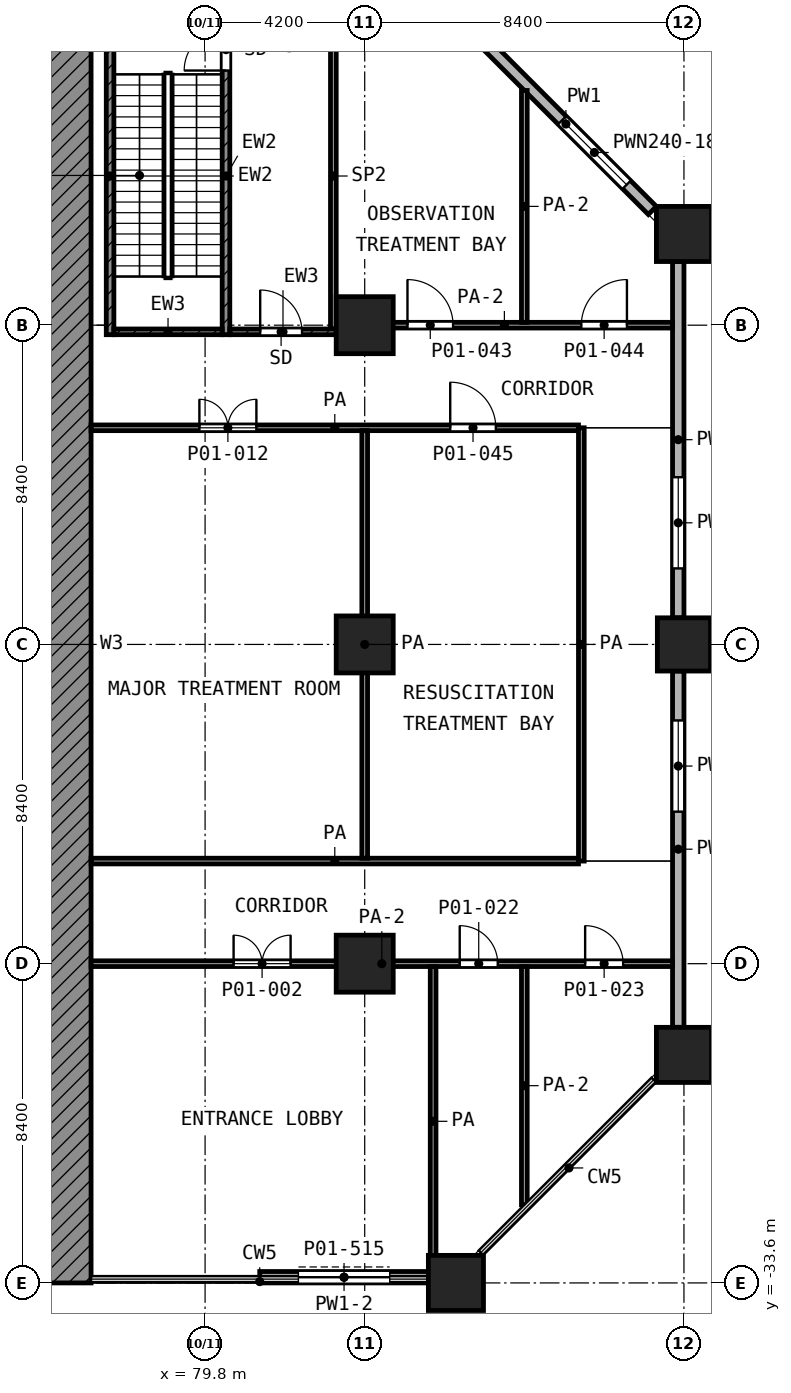
"""IFC4 building model, lengths in metres.
Left out: names, types, materials, properties, quantities, classifications, styles, units other than length and angle.
Written with IfcOpenShell. Run it as: python <this file> out.ifc"""

import sys

from ifc_helpers import new_model, si_unit, direction, frame, frame_2d, origin, origin_2d, place, context, subcontext, project, spatial, polyline, rectangle, outline, extrude, element, fill, save


model = new_model("IFC4")
c1 = context("Model", 3, precision=1e-05, world=origin(), true_north=direction((0.0, 1.0)))
c2 = subcontext(c1, "Body", "Model", "MODEL_VIEW")
j1 = project(units=[si_unit("LENGTHUNIT", "METRE"), si_unit("PLANEANGLEUNIT", "RADIAN")], contexts=[c1])
p1 = place(None, origin())
s1 = spatial("IfcSite", under=j1, at=p1, CompositionType="ELEMENT")
p2 = place(p1, origin())
s2 = spatial("IfcBuilding", under=s1, at=p2, CompositionType="ELEMENT")
p3 = place(p2, origin())
s3 = spatial("IfcBuildingStorey", under=s2, at=p3, CompositionType="ELEMENT", Elevation=0.0)
p4 = place(p3, frame((92.4, -6.0, 0.0), z_axis=(0.0, 0.0, 1.0), x_axis=(1.0, 0.0, 0.0)))
e1 = element("IfcColumn", 1, at=p4, inside=s3, PredefinedType="COLUMN", context=c2, shape_type="SweptSolid", body=[
    extrude(rectangle(XDim=1.45, YDim=1.45, at=origin_2d()), origin(), (0.0, 0.0, 1.0), 7.0),
])
for number, where, z_axis, x_axis in (
    (2, (84.0, -8.4, 0.0), (0.0, 0.0, 1.0), (1.0, 0.0, 0.0)),
    (3, (84.0, -16.8, 0.0), (0.0, 0.0, 1.0), (1.0, 0.0, 0.0)),
):
    element("IfcColumn", number, at=place(p3, frame(where, z_axis=z_axis, x_axis=x_axis)), inside=s3, PredefinedType="COLUMN", context=c2, shape_type="SweptSolid", body=[
        extrude(rectangle(XDim=1.5, YDim=1.5, at=origin_2d()), origin(), (0.0, 0.0, 1.0), 7.0),
    ])
p5 = place(p3, frame((92.4, -16.8, 0.0), z_axis=(0.0, 0.0, 1.0), x_axis=(1.0, 0.0, 0.0)))
e4 = element("IfcColumn", 4, at=p5, inside=s3, PredefinedType="COLUMN", context=c2, shape_type="SweptSolid", body=[
    extrude(rectangle(XDim=1.4, YDim=1.4, at=origin_2d()), origin(), (0.0, 0.0, 1.0), 7.0),
])
p6 = place(p3, frame((84.0, -25.2, 0.0), z_axis=(0.0, 0.0, 1.0), x_axis=(1.0, 0.0, 0.0)))
e5 = element("IfcColumn", 5, at=p6, inside=s3, PredefinedType="COLUMN", context=c2, shape_type="SweptSolid", body=[
    extrude(rectangle(XDim=1.5, YDim=1.5, at=origin_2d()), origin(), (0.0, 0.0, 1.0), 7.0),
])
for number, where, z_axis, x_axis in (
    (6, (92.4, -27.6, 0.0), (0.0, 0.0, 1.0), (1.0, 0.0, 0.0)),
    (7, (86.4, -33.6, 0.0), (0.0, 0.0, 1.0), (1.0, 0.0, 0.0)),
):
    element("IfcColumn", number, at=place(p3, frame(where, z_axis=z_axis, x_axis=x_axis)), inside=s3, PredefinedType="COLUMN", context=c2, shape_type="SweptSolid", body=[
        extrude(rectangle(XDim=1.45, YDim=1.45, at=origin_2d()), origin(), (0.0, 0.0, 1.0), 7.0),
    ])
p7 = place(p3, frame((0.0, 0.0, 0.0), z_axis=(0.0, -1.0, 0.0), x_axis=(1.0, 0.0, 0.0)))
e8 = element("IfcWall", 8, at=p7, inside=s3, PredefinedType="SHEAR", context=c2, shape_type="SweptSolid", body=[
    extrude(outline(polyline([(74.4, 0.0), (74.4, 2.25), (74.4, 4.5), (74.4, 6.75), (74.4, 7.0), (76.8, 7.0), (76.8, 0.0), (74.4, 0.0)])), origin(), (0.0, 0.0, 1.0), 33.6),
])
p8 = place(p3, frame((92.25, -26.875, 0.0), z_axis=(0.0, 0.0, 1.0), x_axis=(0.0, 1.0, 0.0)))
e9 = element("IfcWall", 9, at=p8, inside=s3, PredefinedType="SOLIDWALL", context=c2, shape_type="SweptSolid", body=[
    extrude(rectangle(XDim=9.375, YDim=0.3, at=frame_2d((4.688, 0.0))), origin(), (0.0, 0.0, 1.0), 5.25),
])
p9 = place(p8, frame((5.675, 0.0, 1.0)))
e10 = element("IfcOpeningElement", 10, at=p9, cuts=e9, PredefinedType="OPENING", context=c2, shape_type="SweptSolid", body=[
    extrude(rectangle(XDim=2.4, YDim=1.8, at=frame_2d((1.2, 0.9))), frame((0.0, 0.16, 0.0), z_axis=(0.0, -1.0, 0.0), x_axis=(1.0, 0.0, 0.0)), (0.0, 0.0, 1.0), 0.32),
])
p10 = place(p3, frame((92.25, -16.1, 0.0), z_axis=(0.0, 0.0, 1.0), x_axis=(0.0, 1.0, 0.0)))
e11 = element("IfcWall", 11, at=p10, inside=s3, PredefinedType="SOLIDWALL", context=c2, shape_type="SweptSolid", body=[
    extrude(rectangle(XDim=9.375, YDim=0.3, at=frame_2d((4.688, 0.0))), origin(), (0.0, 0.0, 1.0), 5.25),
])
p11 = place(p10, frame((1.3, 0.0, 1.0)))
e12 = element("IfcOpeningElement", 12, at=p11, cuts=e11, PredefinedType="OPENING", context=c2, shape_type="SweptSolid", body=[
    extrude(rectangle(XDim=2.4, YDim=1.8, at=frame_2d((1.2, 0.9))), frame((0.0, 0.16, 0.0), z_axis=(0.0, -1.0, 0.0), x_axis=(1.0, 0.0, 0.0)), (0.0, 0.0, 1.0), 0.32),
])
p12 = place(p3, frame((91.569, -5.381, 0.0), z_axis=(0.0, 0.0, 1.0), x_axis=(-0.707106781187, 0.707106781187, 0.0)))
e13 = element("IfcWall", 13, at=p12, inside=s3, PredefinedType="SOLIDWALL", context=c2, shape_type="SweptSolid", body=[
    extrude(rectangle(XDim=6.435, YDim=0.3, at=frame_2d((3.217, 0.0))), origin(), (0.0, 0.0, 1.0), 5.25),
])
p13 = place(p12, frame((0.957, 0.0, 1.0)))
e14 = element("IfcOpeningElement", 14, at=p13, cuts=e13, PredefinedType="OPENING", context=c2, shape_type="SweptSolid", body=[
    extrude(rectangle(XDim=2.4, YDim=1.8, at=frame_2d((1.2, 0.9))), frame((0.0, 0.16, 0.0), z_axis=(0.0, -1.0, 0.0), x_axis=(1.0, 0.0, 0.0)), (0.0, 0.0, 1.0), 0.32),
])
p14 = place(p3, frame((81.238, -33.45, 0.0), z_axis=(0.0, 0.0, 1.0), x_axis=(1.0, 0.0, 0.0)))
e15 = element("IfcWall", 15, at=p14, inside=s3, PredefinedType="SOLIDWALL", context=c2, shape_type="SweptSolid", body=[
    extrude(rectangle(XDim=4.438, YDim=0.3, at=frame_2d((2.219, 0.0))), origin(), (0.0, 0.0, 1.0), 6.65),
])
p15 = place(p14, frame((1.019, 0.0, 0.0)))
e16 = element("IfcOpeningElement", 16, at=p15, cuts=e15, PredefinedType="OPENING", context=c2, shape_type="SweptSolid", body=[
    extrude(rectangle(XDim=2.4, YDim=2.4, at=frame_2d((1.2, 1.2))), frame((0.0, 0.16, 0.0), z_axis=(0.0, -1.0, 0.0), x_axis=(1.0, 0.0, 0.0)), (0.0, 0.0, 1.0), 0.32),
])
p16 = place(p3, frame((77.3, -8.65, 0.0), z_axis=(0.0, 0.0, 1.0), x_axis=(0.0, 1.0, 0.0)))
e17 = element("IfcWall", 17, at=p16, inside=s3, PredefinedType="SHEAR", context=c2, shape_type="SweptSolid", body=[
    extrude(rectangle(XDim=8.35, YDim=0.2, at=frame_2d((4.175, 0.0))), origin(), (0.0, 0.0, 1.0), 6.65),
])
p17 = place(p3, frame((80.35, -8.65, 0.0), z_axis=(0.0, 0.0, 1.0), x_axis=(0.0, 1.0, 0.0)))
e18 = element("IfcWall", 18, at=p17, inside=s3, PredefinedType="SHEAR", context=c2, shape_type="SweptSolid", body=[
    extrude(rectangle(XDim=8.35, YDim=0.2, at=frame_2d((4.175, 0.0))), origin(), (0.0, 0.0, 1.0), 6.65),
])
p18 = place(p17, frame((6.95, 0.0, 0.0)))
e19 = element("IfcOpeningElement", 19, at=p18, cuts=e18, PredefinedType="OPENING", context=c2, shape_type="SweptSolid", body=[
    extrude(rectangle(XDim=1.1, YDim=2.1, at=frame_2d((0.55, 1.05))), frame((0.0, 0.11, 0.0), z_axis=(0.0, -1.0, 0.0), x_axis=(1.0, 0.0, 0.0)), (0.0, 0.0, 1.0), 0.22),
])
p19 = place(p3, frame((77.4, -8.575, 0.0), z_axis=(0.0, 0.0, 1.0), x_axis=(1.0, 0.0, 0.0)))
e20 = element("IfcWall", 20, at=p19, inside=s3, PredefinedType="SHEAR", context=c2, shape_type="SweptSolid", body=[
    extrude(rectangle(XDim=2.85, YDim=0.15, at=frame_2d((1.425, 0.0))), origin(), (0.0, 0.0, 1.0), 6.65),
])
p20 = place(p3, frame((80.45, -8.575, 0.0), z_axis=(0.0, 0.0, 1.0), x_axis=(1.0, 0.0, 0.0)))
e21 = element("IfcWall", 21, at=p20, inside=s3, PredefinedType="SHEAR", context=c2, shape_type="SweptSolid", body=[
    extrude(rectangle(XDim=2.8, YDim=0.15, at=frame_2d((1.4, 0.0))), origin(), (0.0, 0.0, 1.0), 6.65),
])
p21 = place(p20, frame((0.8, 0.0, 0.0)))
e22 = element("IfcOpeningElement", 22, at=p21, cuts=e21, PredefinedType="OPENING", context=c2, shape_type="SweptSolid", body=[
    extrude(rectangle(XDim=1.1, YDim=2.1, at=frame_2d((0.55, 1.05))), frame((0.0, 0.085, 0.0), z_axis=(0.0, -1.0, 0.0), x_axis=(1.0, 0.0, 0.0)), (0.0, 0.0, 1.0), 0.17),
])
p22 = place(p3, frame((83.175, -8.5, 0.0), z_axis=(0.0, 0.0, 1.0), x_axis=(0.0, 1.0, 0.0)))
e23 = element("IfcWall", 23, at=p22, inside=s3, PredefinedType="PARTITIONING", context=c2, shape_type="SweptSolid", body=[
    extrude(rectangle(XDim=8.05, YDim=0.15, at=frame_2d((4.025, 0.0))), origin(), (0.0, 0.0, 1.0), 6.65),
])
p23 = place(p3, frame((76.8, -25.2, 0.0), z_axis=(0.0, 0.0, 1.0), x_axis=(1.0, 0.0, 0.0)))
e24 = element("IfcWall", 24, at=p23, inside=s3, PredefinedType="PARTITIONING", context=c2, shape_type="SweptSolid", body=[
    extrude(rectangle(XDim=15.3, YDim=0.15, at=frame_2d((7.65, 0.0))), origin(), (0.0, 0.0, 1.0), 5.25),
])
p24 = place(p23, frame((3.75, 0.0, 0.0)))
e25 = element("IfcOpeningElement", 25, at=p24, cuts=e24, PredefinedType="OPENING", context=c2, shape_type="SweptSolid", body=[
    extrude(rectangle(XDim=1.5, YDim=2.1, at=frame_2d((0.75, 1.05))), frame((0.0, 0.085, 0.0), z_axis=(0.0, -1.0, 0.0), x_axis=(1.0, 0.0, 0.0)), (0.0, 0.0, 1.0), 0.17),
])
p25 = place(p23, frame((9.7, 0.0, 0.0)))
e26 = element("IfcOpeningElement", 26, at=p25, cuts=e24, PredefinedType="OPENING", context=c2, shape_type="SweptSolid", body=[
    extrude(rectangle(XDim=1.0, YDim=2.1, at=frame_2d((0.5, 1.05))), frame((0.0, 0.085, 0.0), z_axis=(0.0, -1.0, 0.0), x_axis=(1.0, 0.0, 0.0)), (0.0, 0.0, 1.0), 0.17),
])
p26 = place(p23, frame((13.0, 0.0, 0.0)))
e27 = element("IfcOpeningElement", 27, at=p26, cuts=e24, PredefinedType="OPENING", context=c2, shape_type="SweptSolid", body=[
    extrude(rectangle(XDim=1.0, YDim=2.1, at=frame_2d((0.5, 1.05))), frame((0.0, 0.085, 0.0), z_axis=(0.0, -1.0, 0.0), x_axis=(1.0, 0.0, 0.0)), (0.0, 0.0, 1.0), 0.17),
])
p27 = place(p3, frame((76.8, -22.5, 0.0), z_axis=(0.0, 0.0, 1.0), x_axis=(1.0, 0.0, 0.0)))
e28 = element("IfcWall", 28, at=p27, inside=s3, PredefinedType="PARTITIONING", context=c2, shape_type="SweptSolid", body=[
    extrude(rectangle(XDim=12.825, YDim=0.15, at=frame_2d((6.413, 0.0))), origin(), (0.0, 0.0, 1.0), 6.65),
])
p28 = place(p3, frame((76.8, -11.1, 0.0), z_axis=(0.0, 0.0, 1.0), x_axis=(1.0, 0.0, 0.0)))
e29 = element("IfcWall", 29, at=p28, inside=s3, PredefinedType="PARTITIONING", context=c2, shape_type="SweptSolid", body=[
    extrude(rectangle(XDim=12.825, YDim=0.15, at=frame_2d((6.413, 0.0))), origin(), (0.0, 0.0, 1.0), 6.65),
])
p29 = place(p28, frame((2.85, 0.0, 0.0)))
e30 = element("IfcOpeningElement", 30, at=p29, cuts=e29, PredefinedType="OPENING", context=c2, shape_type="SweptSolid", body=[
    extrude(rectangle(XDim=1.5, YDim=2.1, at=frame_2d((0.75, 1.05))), frame((0.0, 0.085, 0.0), z_axis=(0.0, -1.0, 0.0), x_axis=(1.0, 0.0, 0.0)), (0.0, 0.0, 1.0), 0.17),
])
p30 = place(p28, frame((9.45, 0.0, 0.0)))
e31 = element("IfcOpeningElement", 31, at=p30, cuts=e29, PredefinedType="OPENING", context=c2, shape_type="SweptSolid", body=[
    extrude(rectangle(XDim=1.2, YDim=2.1, at=frame_2d((0.6, 1.05))), frame((0.0, 0.085, 0.0), z_axis=(0.0, -1.0, 0.0), x_axis=(1.0, 0.0, 0.0)), (0.0, 0.0, 1.0), 0.17),
])
p31 = place(p3, frame((83.25, -8.4, 0.0), z_axis=(0.0, 0.0, 1.0), x_axis=(1.0, 0.0, 0.0)))
e32 = element("IfcWall", 32, at=p31, inside=s3, PredefinedType="PARTITIONING", context=c2, shape_type="SweptSolid", body=[
    extrude(rectangle(XDim=8.85, YDim=0.15, at=frame_2d((4.425, 0.0))), origin(), (0.0, 0.0, 1.0), 5.25),
])
p32 = place(p31, frame((1.875, 0.0, 0.0)))
e33 = element("IfcOpeningElement", 33, at=p32, cuts=e32, PredefinedType="OPENING", context=c2, shape_type="SweptSolid", body=[
    extrude(rectangle(XDim=1.2, YDim=2.1, at=frame_2d((0.6, 1.05))), frame((0.0, 0.085, 0.0), z_axis=(0.0, -1.0, 0.0), x_axis=(1.0, 0.0, 0.0)), (0.0, 0.0, 1.0), 0.17),
])
p33 = place(p31, frame((6.45, 0.0, 0.0)))
e34 = element("IfcOpeningElement", 34, at=p33, cuts=e32, PredefinedType="OPENING", context=c2, shape_type="SweptSolid", body=[
    extrude(rectangle(XDim=1.2, YDim=2.1, at=frame_2d((0.6, 1.05))), frame((0.0, 0.085, 0.0), z_axis=(0.0, -1.0, 0.0), x_axis=(1.0, 0.0, 0.0)), (0.0, 0.0, 1.0), 0.17),
])
p34 = place(p3, frame((84.0, -22.425, 0.0), z_axis=(0.0, 0.0, 1.0), x_axis=(0.0, 1.0, 0.0)))
e35 = element("IfcWall", 35, at=p34, inside=s3, PredefinedType="PARTITIONING", context=c2, shape_type="SweptSolid", body=[
    extrude(rectangle(XDim=11.25, YDim=0.15, at=frame_2d((5.625, 0.0))), origin(), (0.0, 0.0, 1.0), 6.65),
])
p35 = place(p3, frame((85.8, -33.42, 0.0), z_axis=(0.0, 0.0, 1.0), x_axis=(0.0, 1.0, 0.0)))
e36 = element("IfcWall", 36, at=p35, inside=s3, PredefinedType="PARTITIONING", context=c2, shape_type="SweptSolid", body=[
    extrude(rectangle(XDim=8.145, YDim=0.15, at=frame_2d((4.073, 0.0))), origin(), (0.0, 0.0, 1.0), 6.65),
])
p36 = place(p3, frame((88.2, -31.545, 0.0), z_axis=(0.0, 0.0, 1.0), x_axis=(0.0, 1.0, 0.0)))
e37 = element("IfcWall", 37, at=p36, inside=s3, PredefinedType="PARTITIONING", context=c2, shape_type="SweptSolid", body=[
    extrude(rectangle(XDim=6.27, YDim=0.15, at=frame_2d((3.135, 0.0))), origin(), (0.0, 0.0, 1.0), 5.25),
])
p37 = place(p3, frame((88.2, -8.325, 0.0), z_axis=(0.0, 0.0, 1.0), x_axis=(0.0, 1.0, 0.0)))
e38 = element("IfcWall", 38, at=p37, inside=s3, PredefinedType="PARTITIONING", context=c2, shape_type="SweptSolid", body=[
    extrude(rectangle(XDim=6.101, YDim=0.15, at=frame_2d((3.05, 0.0))), origin(), (0.0, 0.0, 1.0), 5.25),
])
p38 = place(p3, frame((89.7, -22.5, 0.0), z_axis=(0.0, 0.0, 1.0), x_axis=(0.0, 1.0, 0.0)))
e39 = element("IfcWall", 39, at=p38, inside=s3, PredefinedType="PARTITIONING", context=c2, shape_type="SweptSolid", body=[
    extrude(rectangle(XDim=11.4, YDim=0.15, at=frame_2d((5.7, 0.0))), origin(), (0.0, 0.0, 1.0), 6.65),
])
p39 = place(p9, origin())
e40 = element("IfcWindow", 40, at=p39, inside=s3, PartitioningType="SINGLE_PANEL", PredefinedType="WINDOW", context=c2, shape_type="SweptSolid", body=[
    extrude(rectangle(XDim=2.4, YDim=1.8, at=frame_2d((1.2, 0.9))), frame((0.0, 0.03, 0.0), z_axis=(0.0, -1.0, 0.0), x_axis=(1.0, 0.0, 0.0)), (0.0, 0.0, 1.0), 0.06),
])
fill(e10, e40)
p40 = place(p11, origin())
e41 = element("IfcWindow", 41, at=p40, inside=s3, PartitioningType="SINGLE_PANEL", PredefinedType="WINDOW", context=c2, shape_type="SweptSolid", body=[
    extrude(rectangle(XDim=2.4, YDim=1.8, at=frame_2d((1.2, 0.9))), frame((0.0, 0.03, 0.0), z_axis=(0.0, -1.0, 0.0), x_axis=(1.0, 0.0, 0.0)), (0.0, 0.0, 1.0), 0.06),
])
fill(e12, e41)
p41 = place(p13, origin())
e42 = element("IfcWindow", 42, at=p41, inside=s3, PartitioningType="SINGLE_PANEL", PredefinedType="WINDOW", context=c2, shape_type="SweptSolid", body=[
    extrude(rectangle(XDim=2.4, YDim=1.8, at=frame_2d((1.2, 0.9))), frame((0.0, 0.03, 0.0), z_axis=(0.0, -1.0, 0.0), x_axis=(1.0, 0.0, 0.0)), (0.0, 0.0, 1.0), 0.06),
])
fill(e14, e42)
p42 = place(p15, origin())
e43 = element("IfcDoor", 43, at=p42, inside=s3, OperationType="DOUBLE_DOOR_SLIDING", PredefinedType="DOOR", context=c2, shape_type="SweptSolid", body=[
    extrude(rectangle(XDim=2.4, YDim=2.4, at=frame_2d((1.2, 1.2))), frame((0.0, 0.025, 0.0), z_axis=(0.0, -1.0, 0.0), x_axis=(1.0, 0.0, 0.0)), (0.0, 0.0, 1.0), 0.05),
])
fill(e16, e43)
p43 = place(p18, origin())
e44 = element("IfcDoor", 44, at=p43, inside=s3, OperationType="SINGLE_SWING_LEFT", PredefinedType="DOOR", context=c2, shape_type="SweptSolid", body=[
    extrude(rectangle(XDim=1.1, YDim=2.1, at=frame_2d((0.55, 1.05))), frame((0.0, 0.025, 0.0), z_axis=(0.0, -1.0, 0.0), x_axis=(1.0, 0.0, 0.0)), (0.0, 0.0, 1.0), 0.05),
])
fill(e19, e44)
p44 = place(p21, origin())
e45 = element("IfcDoor", 45, at=p44, inside=s3, OperationType="SINGLE_SWING_LEFT", PredefinedType="DOOR", context=c2, shape_type="SweptSolid", body=[
    extrude(rectangle(XDim=1.1, YDim=2.1, at=frame_2d((0.55, 1.05))), frame((0.0, 0.025, 0.0), z_axis=(0.0, -1.0, 0.0), x_axis=(1.0, 0.0, 0.0)), (0.0, 0.0, 1.0), 0.05),
])
fill(e22, e45)
p45 = place(p24, origin())
e46 = element("IfcDoor", 46, at=p45, inside=s3, OperationType="DOUBLE_DOOR_SINGLE_SWING", PredefinedType="DOOR", context=c2, shape_type="SweptSolid", body=[
    extrude(rectangle(XDim=1.5, YDim=2.1, at=frame_2d((0.75, 1.05))), frame((0.0, 0.025, 0.0), z_axis=(0.0, -1.0, 0.0), x_axis=(1.0, 0.0, 0.0)), (0.0, 0.0, 1.0), 0.05),
])
fill(e25, e46)
p46 = place(p32, origin())
e47 = element("IfcDoor", 47, at=p46, inside=s3, OperationType="SINGLE_SWING_LEFT", PredefinedType="DOOR", context=c2, shape_type="SweptSolid", body=[
    extrude(rectangle(XDim=1.2, YDim=2.1, at=frame_2d((0.6, 1.05))), frame((0.0, 0.025, 0.0), z_axis=(0.0, -1.0, 0.0), x_axis=(1.0, 0.0, 0.0)), (0.0, 0.0, 1.0), 0.05),
])
fill(e33, e47)
p47 = place(p33, origin())
e48 = element("IfcDoor", 48, at=p47, inside=s3, OperationType="SINGLE_SWING_RIGHT", PredefinedType="DOOR", context=c2, shape_type="SweptSolid", body=[
    extrude(rectangle(XDim=1.2, YDim=2.1, at=frame_2d((0.6, 1.05))), frame((0.0, 0.025, 0.0), z_axis=(0.0, -1.0, 0.0), x_axis=(1.0, 0.0, 0.0)), (0.0, 0.0, 1.0), 0.05),
])
fill(e34, e48)
p48 = place(p29, origin())
e49 = element("IfcDoor", 49, at=p48, inside=s3, OperationType="DOUBLE_DOOR_SINGLE_SWING", PredefinedType="DOOR", context=c2, shape_type="SweptSolid", body=[
    extrude(rectangle(XDim=1.5, YDim=2.1, at=frame_2d((0.75, 1.05))), frame((0.0, 0.025, 0.0), z_axis=(0.0, -1.0, 0.0), x_axis=(1.0, 0.0, 0.0)), (0.0, 0.0, 1.0), 0.05),
])
fill(e30, e49)
p49 = place(p30, origin())
e50 = element("IfcDoor", 50, at=p49, inside=s3, OperationType="SINGLE_SWING_LEFT", PredefinedType="DOOR", context=c2, shape_type="SweptSolid", body=[
    extrude(rectangle(XDim=1.2, YDim=2.1, at=frame_2d((0.6, 1.05))), frame((0.0, 0.025, 0.0), z_axis=(0.0, -1.0, 0.0), x_axis=(1.0, 0.0, 0.0)), (0.0, 0.0, 1.0), 0.05),
])
fill(e31, e50)
p50 = place(p25, origin())
e51 = element("IfcDoor", 51, at=p50, inside=s3, OperationType="SINGLE_SWING_LEFT", PredefinedType="DOOR", context=c2, shape_type="SweptSolid", body=[
    extrude(rectangle(XDim=1.0, YDim=2.1, at=frame_2d((0.5, 1.05))), frame((0.0, 0.025, 0.0), z_axis=(0.0, -1.0, 0.0), x_axis=(1.0, 0.0, 0.0)), (0.0, 0.0, 1.0), 0.05),
])
fill(e26, e51)
p51 = place(p26, origin())
e52 = element("IfcDoor", 52, at=p51, inside=s3, OperationType="SINGLE_SWING_LEFT", PredefinedType="DOOR", context=c2, shape_type="SweptSolid", body=[
    extrude(rectangle(XDim=1.0, YDim=2.1, at=frame_2d((0.5, 1.05))), frame((0.0, 0.025, 0.0), z_axis=(0.0, -1.0, 0.0), x_axis=(1.0, 0.0, 0.0)), (0.0, 0.0, 1.0), 0.05),
])
fill(e27, e52)
save(model, sys.argv[1])
